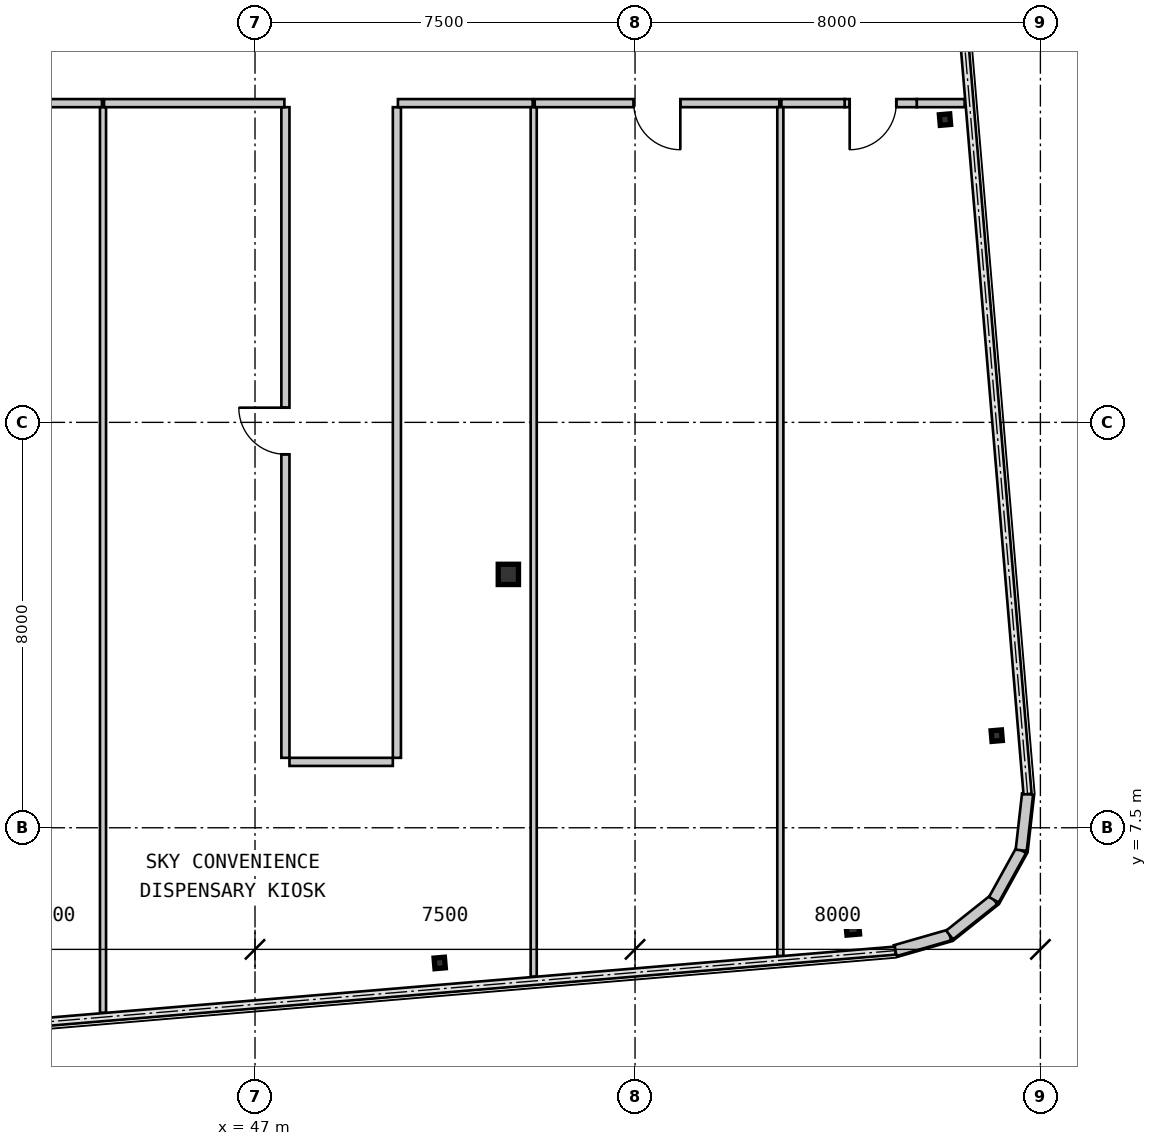
"""IFC4 building model, lengths in metres.
Left out: names, types, materials, properties, quantities, classifications, styles, units other than length and angle.
Written with IfcOpenShell. Run it as: python <this file> out.ifc"""

import sys

from ifc_helpers import new_model, si_unit, direction, frame, frame_2d, origin, origin_2d, place, context, subcontext, project, spatial, rectangle, hollow_rectangle, i_section, extrude, source, transform, mapped, element, fill, save


model = new_model("IFC4")
c1 = context("Model", 3, precision=1e-05, world=origin(), true_north=direction((0.0, 1.0)))
c2 = subcontext(c1, "Body", "Model", "MODEL_VIEW")
j1 = project(units=[si_unit("LENGTHUNIT", "METRE"), si_unit("PLANEANGLEUNIT", "RADIAN")], contexts=[c1])
p1 = place(None, origin())
s1 = spatial("IfcSite", under=j1, at=p1, CompositionType="ELEMENT")
p2 = place(p1, origin())
s2 = spatial("IfcBuilding", under=s1, at=p2, CompositionType="ELEMENT")
p3 = place(p2, frame((0.0, 0.0, 204.05)))
s3 = spatial("IfcBuildingStorey", under=s2, at=p3, CompositionType="ELEMENT", Elevation=204.05)
m1 = source(origin(), c2, "Body", "SweptSolid", [
    extrude(hollow_rectangle(XDim=0.4, YDim=0.4, WallThickness=0.016, at=origin_2d()), origin(), (0.0, 0.0, 1.0), 3.15),
])
p4 = place(p3, frame((52.0, 12.5, 0.0), z_axis=(0.0, 0.0, 1.0), x_axis=(1.0, 0.0, 0.0)))
e1 = element("IfcColumn", 1, at=p4, inside=s3, PredefinedType="COLUMN", context=c2, shape_type="MappedRepresentation", body=[
    mapped(m1, transform((0.0, 0.0, 0.0), scale=1.0)),
])
m2 = source(origin(), c2, "Body", "SweptSolid", [
    extrude(i_section(OverallWidth=0.205, OverallDepth=0.21, WebThickness=0.009, FlangeThickness=0.014, at=origin_2d()), origin(), (0.0, 0.0, 1.0), 3.15),
])
p5 = place(p3, frame((50.645, 4.832, 0.0), z_axis=(0.0, 0.0, 1.0), x_axis=(0.99649285925, 0.083677843332, 0.0)))
e2 = element("IfcColumn", 2, at=p5, inside=s3, PredefinedType="COLUMN", context=c2, shape_type="MappedRepresentation", body=[
    mapped(m2, transform((0.0, 0.0, 0.0), scale=1.0)),
])
m3 = source(origin(), c2, "Body", "SweptSolid", [
    extrude(hollow_rectangle(XDim=0.25, YDim=0.25, WallThickness=0.01, at=origin_2d()), origin(), (0.0, 0.0, 1.0), 3.15),
])
p6 = place(p3, frame((58.796, 5.516, 0.0), z_axis=(0.0, 0.0, 1.0), x_axis=(0.99649285925, 0.083677843332, 0.0)))
e3 = element("IfcColumn", 3, at=p6, inside=s3, PredefinedType="COLUMN", context=c2, shape_type="MappedRepresentation", body=[
    mapped(m3, transform((0.0, 0.0, 0.0), scale=1.0)),
])
for number, where, z_axis, x_axis in (
    (4, (61.638, 9.318, 0.0), (0.0, 0.0, 1.0), (0.996, 0.084, 0.0)),
    (5, (60.617, 21.475, 0.0), (0.0, 0.0, 1.0), (0.996, 0.084, 0.0)),
):
    element("IfcColumn", number, at=place(p3, frame(where, z_axis=z_axis, x_axis=x_axis)), inside=s3, PredefinedType="COLUMN", context=c2, shape_type="MappedRepresentation", body=[
        mapped(m2, transform((0.0, 0.0, 0.0), scale=1.0)),
    ])
m4 = source(origin(), c2, "Body", "SweptSolid", [
    extrude(rectangle(XDim=1.116, YDim=0.22, at=frame_2d((0.558, 0.0))), origin(), (0.0, 0.0, 1.0), 2.87),
])
for number, where, z_axis, x_axis in (
    (6, (59.636, 5.075, 0.0), (0.0, 0.0, 1.0), (0.961, 0.277, 0.0)),
    (7, (60.708, 5.384, 0.0), (0.0, 0.0, 1.0), (0.782, 0.623, 0.0)),
    (8, (61.581, 6.079, 0.0), (0.0, 0.0, 1.0), (0.484, 0.875, 0.0)),
    (9, (62.121, 7.056, 0.0), (0.0, 0.0, 1.0), (0.112, 0.994, 0.0)),
):
    element("IfcWall", number, at=place(p3, frame(where, z_axis=z_axis, x_axis=x_axis)), inside=s3, PredefinedType="SOLIDWALL", context=c2, shape_type="MappedRepresentation", body=[
        mapped(m4, transform((0.0, 0.0, 0.0), scale=1.0)),
    ])
m5 = source(origin(), c2, "Body", "SweptSolid", [
    extrude(rectangle(XDim=4.459, YDim=0.16, at=frame_2d((2.23, 0.0))), origin(), (0.0, 0.0, 1.0), 2.87),
])
p7 = place(p3, frame((43.98, 21.8, 0.0), z_axis=(0.0, 0.0, 1.0), x_axis=(-1.0, 0.0, 0.0)))
e10 = element("IfcWall", 10, at=p7, inside=s3, PredefinedType="PARTITIONING", context=c2, shape_type="MappedRepresentation", body=[
    mapped(m5, transform((0.0, 0.0, 0.0), scale=1.0)),
])
m6 = source(origin(), c2, "Body", "SweptSolid", [
    extrude(rectangle(XDim=0.92, YDim=2.1, at=frame_2d((0.46, 1.05))), frame((0.0, 0.09, 0.0), z_axis=(0.0, -1.0, 0.0), x_axis=(1.0, 0.0, 0.0)), (0.0, 0.0, 1.0), 0.18),
])
p8 = place(p7, frame((1.77, 0.0, 0.0)))
e11 = element("IfcOpeningElement", 11, at=p8, cuts=e10, PredefinedType="OPENING", context=c2, shape_type="MappedRepresentation", body=[
    mapped(m6, transform((0.0, 0.0, 0.0), scale=1.0)),
])
m7 = source(origin(), c2, "Body", "SweptSolid", [
    extrude(rectangle(XDim=12.84, YDim=0.16, at=frame_2d((6.42, 0.0))), origin(), (0.0, 0.0, 1.0), 2.87),
])
p9 = place(p3, frame((47.6, 8.88, 0.0), z_axis=(0.0, 0.0, 1.0), x_axis=(0.0, 1.0, 0.0)))
e12 = element("IfcWall", 12, at=p9, inside=s3, PredefinedType="PARTITIONING", context=c2, shape_type="MappedRepresentation", body=[
    mapped(m7, transform((0.0, 0.0, 0.0), scale=1.0)),
])
p10 = place(p9, frame((5.99, 0.0, 0.0)))
e13 = element("IfcOpeningElement", 13, at=p10, cuts=e12, PredefinedType="OPENING", context=c2, shape_type="MappedRepresentation", body=[
    mapped(m6, transform((0.0, 0.0, 0.0), scale=1.0)),
])
p11 = place(p3, frame((49.8, 21.72, 0.0), z_axis=(0.0, 0.0, 1.0), x_axis=(0.0, -1.0, 0.0)))
e14 = element("IfcWall", 14, at=p11, inside=s3, PredefinedType="PARTITIONING", context=c2, shape_type="MappedRepresentation", body=[
    mapped(m7, transform((0.0, 0.0, 0.0), scale=1.0)),
])
m8 = source(origin(), c2, "Body", "SweptSolid", [
    extrude(rectangle(XDim=3.559, YDim=0.16, at=frame_2d((1.78, 0.0))), origin(), (0.0, 0.0, 1.0), 2.87),
])
p12 = place(p3, frame((47.58, 21.8, 0.0), z_axis=(0.0, 0.0, 1.0), x_axis=(-1.0, 0.0, 0.0)))
e15 = element("IfcWall", 15, at=p12, inside=s3, PredefinedType="PARTITIONING", context=c2, shape_type="MappedRepresentation", body=[
    mapped(m8, transform((0.0, 0.0, 0.0), scale=1.0)),
])
m9 = source(origin(), c2, "Body", "SweptSolid", [
    extrude(rectangle(XDim=2.659, YDim=0.16, at=frame_2d((1.33, 0.0))), origin(), (0.0, 0.0, 1.0), 2.87),
])
p13 = place(p3, frame((52.48, 21.8, 0.0), z_axis=(0.0, 0.0, 1.0), x_axis=(-1.0, 0.0, 0.0)))
e16 = element("IfcWall", 16, at=p13, inside=s3, PredefinedType="PARTITIONING", context=c2, shape_type="MappedRepresentation", body=[
    mapped(m9, transform((0.0, 0.0, 0.0), scale=1.0)),
])
m10 = source(origin(), c2, "Body", "SweptSolid", [
    extrude(rectangle(XDim=2.04, YDim=0.16, at=frame_2d((1.02, 0.0))), origin(), (0.0, 0.0, 1.0), 2.87),
])
p14 = place(p3, frame((49.72, 8.8, 0.0), z_axis=(0.0, 0.0, 1.0), x_axis=(-1.0, 0.0, 0.0)))
e17 = element("IfcWall", 17, at=p14, inside=s3, PredefinedType="PARTITIONING", context=c2, shape_type="MappedRepresentation", body=[
    mapped(m10, transform((0.0, 0.0, 0.0), scale=1.0)),
])
m11 = source(origin(), c2, "Body", "SweptSolid", [
    extrude(rectangle(XDim=4.827, YDim=0.16, at=frame_2d((2.414, 0.0))), origin(), (0.0, 0.0, 1.0), 2.87),
])
p15 = place(p3, frame((57.347, 21.8, 0.0), z_axis=(0.0, 0.0, 1.0), x_axis=(-1.0, 0.0, 0.0)))
e18 = element("IfcWall", 18, at=p15, inside=s3, PredefinedType="PARTITIONING", context=c2, shape_type="MappedRepresentation", body=[
    mapped(m11, transform((0.0, 0.0, 0.0), scale=1.0)),
])
p16 = place(p15, frame((1.954, 0.0, 0.0)))
e19 = element("IfcOpeningElement", 19, at=p16, cuts=e18, PredefinedType="OPENING", context=c2, shape_type="MappedRepresentation", body=[
    mapped(m6, transform((0.0, 0.0, 0.0), scale=1.0)),
])
m12 = source(origin(), c2, "Body", "SweptSolid", [
    extrude(rectangle(XDim=0.945, YDim=0.16, at=frame_2d((0.473, 0.0))), origin(), (0.0, 0.0, 1.0), 2.87),
])
p17 = place(p3, frame((61.005, 21.8, 0.0), z_axis=(0.0, 0.0, 1.0), x_axis=(-1.0, 0.0, 0.0)))
e20 = element("IfcWall", 20, at=p17, inside=s3, PredefinedType="PARTITIONING", context=c2, shape_type="MappedRepresentation", body=[
    mapped(m12, transform((0.0, 0.0, 0.0), scale=1.0)),
])
m13 = source(origin(), c2, "Body", "SweptSolid", [
    extrude(rectangle(XDim=1.423, YDim=0.16, at=frame_2d((0.711, 0.0))), origin(), (0.0, 0.0, 1.0), 2.41),
])
p18 = place(p3, frame((60.059, 21.8, 0.0), z_axis=(0.0, 0.0, 1.0), x_axis=(-1.0, 0.0, 0.0)))
e21 = element("IfcWall", 21, at=p18, inside=s3, PredefinedType="PARTITIONING", context=c2, shape_type="MappedRepresentation", body=[
    mapped(m13, transform((0.0, 0.0, 0.0), scale=1.0)),
])
p19 = place(p18, frame((0.403, 0.0, 0.0)))
e22 = element("IfcOpeningElement", 22, at=p19, cuts=e21, PredefinedType="OPENING", context=c2, shape_type="MappedRepresentation", body=[
    mapped(m6, transform((0.0, 0.0, 0.0), scale=1.0)),
])
m14 = source(origin(), c2, "Body", "SweptSolid", [
    extrude(rectangle(XDim=1.249, YDim=0.16, at=frame_2d((0.624, 0.0))), origin(), (0.0, 0.0, 1.0), 2.87),
])
p20 = place(p3, frame((58.636, 21.8, 0.0), z_axis=(0.0, 0.0, 1.0), x_axis=(-1.0, 0.0, 0.0)))
e23 = element("IfcWall", 23, at=p20, inside=s3, PredefinedType="PARTITIONING", context=c2, shape_type="MappedRepresentation", body=[
    mapped(m14, transform((0.0, 0.0, 0.0), scale=1.0)),
])
m15 = source(origin(), c2, "Body", "SweptSolid", [
    extrude(rectangle(XDim=17.87, YDim=0.12, at=frame_2d((8.935, 0.0))), origin(), (0.0, 0.0, 1.0), 2.87),
])
p21 = place(p3, frame((44.0, 21.718, 0.0), z_axis=(0.0, 0.0, 1.0), x_axis=(0.0, -1.0, 0.0)))
e24 = element("IfcWall", 24, at=p21, inside=s3, PredefinedType="PARTITIONING", context=c2, shape_type="MappedRepresentation", body=[
    mapped(m15, transform((0.0, 0.0, 0.0), scale=1.0)),
])
m16 = source(origin(), c2, "Body", "SweptSolid", [
    extrude(rectangle(XDim=17.156, YDim=0.12, at=frame_2d((8.578, 0.0))), origin(), (0.0, 0.0, 1.0), 2.87),
])
p22 = place(p3, frame((52.5, 21.718, 0.0), z_axis=(0.0, 0.0, 1.0), x_axis=(0.0, -1.0, 0.0)))
e25 = element("IfcWall", 25, at=p22, inside=s3, PredefinedType="PARTITIONING", context=c2, shape_type="MappedRepresentation", body=[
    mapped(m16, transform((0.0, 0.0, 0.0), scale=1.0)),
])
m17 = source(origin(), c2, "Body", "SweptSolid", [
    extrude(rectangle(XDim=16.752, YDim=0.12, at=frame_2d((8.376, 0.0))), origin(), (0.0, 0.0, 1.0), 2.87),
])
p23 = place(p3, frame((57.368, 21.72, 0.0), z_axis=(0.0, 0.0, 1.0), x_axis=(0.0, -1.0, 0.0)))
e26 = element("IfcWall", 26, at=p23, inside=s3, PredefinedType="PARTITIONING", context=c2, shape_type="MappedRepresentation", body=[
    mapped(m17, transform((0.0, 0.0, 0.0), scale=1.0)),
])
m18 = source(origin(), c2, "Body", "SweptSolid", [
    extrude(rectangle(XDim=0.92, YDim=2.1, at=frame_2d((0.46, 1.05))), frame((0.0, 0.025, 0.0), z_axis=(0.0, -1.0, 0.0), x_axis=(1.0, 0.0, 0.0)), (0.0, 0.0, 1.0), 0.05),
])
p24 = place(p10, origin())
e27 = element("IfcDoor", 27, at=p24, inside=s3, OperationType="SINGLE_SWING_RIGHT", PredefinedType="DOOR", context=c2, shape_type="MappedRepresentation", body=[
    mapped(m18, transform((0.0, 0.0, 0.0), scale=1.0)),
])
fill(e13, e27)
p25 = place(p16, origin())
e28 = element("IfcDoor", 28, at=p25, inside=s3, OperationType="SINGLE_SWING_LEFT", PredefinedType="DOOR", context=c2, shape_type="MappedRepresentation", body=[
    mapped(m18, transform((0.0, 0.0, 0.0), scale=1.0)),
])
fill(e19, e28)
p26 = place(p19, origin())
e29 = element("IfcDoor", 29, at=p26, inside=s3, OperationType="SINGLE_SWING_RIGHT", PredefinedType="DOOR", context=c2, shape_type="MappedRepresentation", body=[
    mapped(m18, transform((0.0, 0.0, 0.0), scale=1.0)),
])
fill(e22, e29)
save(model, sys.argv[1])
